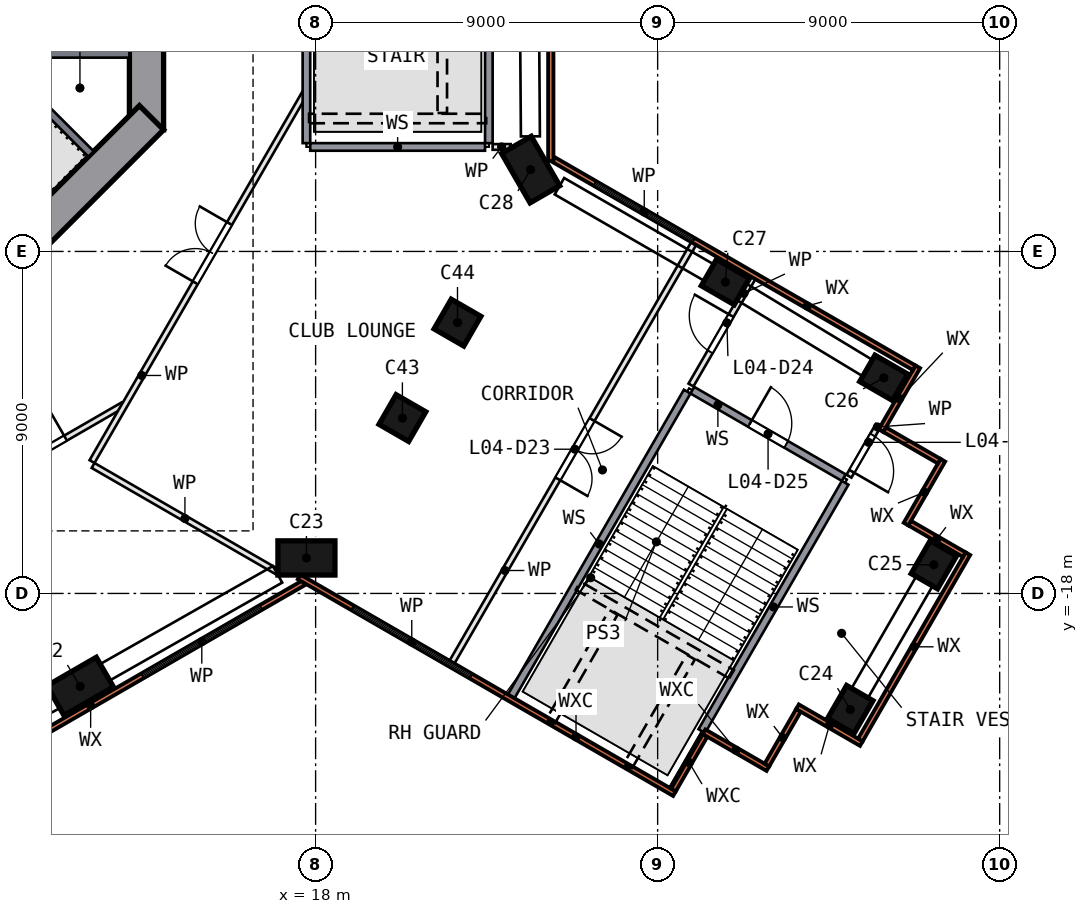
"""IFC4 building model, lengths in metres.
Left out: names, types, materials, properties, quantities, classifications, styles, units other than length and angle.
Written with IfcOpenShell. Run it as: python <this file> out.ifc"""

import sys

from ifc_helpers import new_model, si_unit, direction, frame, frame_2d, origin, origin_2d, place, context, subcontext, project, spatial, polyline, rectangle, outline, extrude, element, fill, save


model = new_model("IFC4")
c1 = context("Model", 3, precision=1e-05, world=origin(), true_north=direction((0.0, 1.0)))
c2 = subcontext(c1, "Body", "Model", "MODEL_VIEW")
j1 = project(units=[si_unit("LENGTHUNIT", "METRE"), si_unit("PLANEANGLEUNIT", "RADIAN")], contexts=[c1])
p1 = place(None, origin())
s1 = spatial("IfcSite", under=j1, at=p1, CompositionType="ELEMENT")
p2 = place(p1, origin())
s2 = spatial("IfcBuilding", under=s1, at=p2, CompositionType="ELEMENT")
p3 = place(p2, frame((0.0, 0.0, 23.5)))
s3 = spatial("IfcBuildingStorey", under=s2, at=p3, CompositionType="ELEMENT", Elevation=23.5)
for number, where, z_axis, x_axis in (
    (1, (11.804, -20.445, 0.0), (0.0, 0.0, 1.0), (0.866, 0.5, 0.0)),
    (2, (17.758, -17.065, 0.0), (0.0, 0.0, 1.0), (-1.0, 0.0, 0.0)),
):
    element("IfcColumn", number, at=place(p3, frame(where, z_axis=z_axis, x_axis=x_axis)), inside=s3, PredefinedType="COLUMN", context=c2, shape_type="SweptSolid", body=[
        extrude(rectangle(XDim=1.5, YDim=0.9, at=origin_2d()), origin(), (0.0, 0.0, 1.0), 4.0),
    ])
for number, where, z_axis, x_axis in (
    (3, (32.069, -21.055, 0.0), (0.0, 0.0, 1.0), (0.5, 0.866, 0.0)),
    (4, (34.269, -17.245, 0.0), (0.0, 0.0, 1.0), (0.5, 0.866, 0.0)),
    (5, (32.951, -12.327, 0.0), (0.0, 0.0, 1.0), (-0.866, 0.5, 0.0)),
    (6, (28.783, -9.805, 0.0), (0.0, 0.0, 1.0), (-0.866, 0.5, 0.0)),
):
    element("IfcColumn", number, at=place(p3, frame(where, z_axis=z_axis, x_axis=x_axis)), inside=s3, PredefinedType="COLUMN", context=c2, shape_type="SweptSolid", body=[
        extrude(rectangle(XDim=1.0, YDim=0.8, at=origin_2d()), origin(), (0.0, 0.0, 1.0), 4.0),
    ])
p4 = place(p3, frame((23.658, -6.846, 0.0), z_axis=(0.0, 0.0, 1.0), x_axis=(0.5, -0.866025404, 0.0)))
e7 = element("IfcColumn", 7, at=p4, inside=s3, PredefinedType="COLUMN", context=c2, shape_type="SweptSolid", body=[
    extrude(rectangle(XDim=1.5, YDim=0.9, at=origin_2d()), origin(), (0.0, 0.0, 1.0), 4.0),
])
for number, where, z_axis, x_axis in (
    (8, (20.283, -13.385, 0.0), (0.0, 0.0, 1.0), (0.866, -0.5, 0.0)),
    (9, (21.733, -10.873, 0.0), (0.0, 0.0, 1.0), (0.866, -0.5, 0.0)),
):
    element("IfcColumn", number, at=place(p3, frame(where, z_axis=z_axis, x_axis=x_axis)), inside=s3, PredefinedType="COLUMN", context=c2, shape_type="SweptSolid", body=[
        extrude(rectangle(XDim=0.9, YDim=0.9, at=origin_2d()), origin(), (0.0, 0.0, 1.0), 4.0),
    ])
p5 = place(p3, frame((13.55, -5.799, 0.0), z_axis=(0.0, 0.0, 1.0), x_axis=(0.0, 1.0, 0.0)))
e10 = element("IfcWall", 10, at=p5, inside=s3, PredefinedType="SHEAR", context=c2, shape_type="SweptSolid", body=[
    extrude(rectangle(XDim=11.598, YDim=0.9, at=frame_2d((5.799, 0.0))), origin(), (0.0, 0.0, 1.0), 4.5),
])
p6 = place(p5, frame((4.899, 0.0, 0.0)))
e11 = element("IfcOpeningElement", 11, at=p6, cuts=e10, PredefinedType="OPENING", context=c2, shape_type="SweptSolid", body=[
    extrude(rectangle(XDim=1.8, YDim=2.1, at=frame_2d((0.9, 1.05))), frame((0.0, 0.46, 0.0), z_axis=(0.0, -1.0, 0.0), x_axis=(1.0, 0.0, 0.0)), (0.0, 0.0, 1.0), 0.92),
])
p7 = place(p3, frame((5.481, -13.682, 0.0), z_axis=(0.0, 0.0, 1.0), x_axis=(0.707106781, 0.707106781, 0.0)))
e12 = element("IfcWall", 12, at=p7, inside=s3, PredefinedType="SHEAR", context=c2, shape_type="SweptSolid", body=[
    extrude(rectangle(XDim=11.598, YDim=0.9, at=frame_2d((5.799, 0.0))), origin(), (0.0, 0.0, 1.0), 4.5),
])
p8 = place(p7, frame((2.099, 0.0, 0.0)))
e13 = element("IfcOpeningElement", 13, at=p8, cuts=e12, PredefinedType="OPENING", context=c2, shape_type="SweptSolid", body=[
    extrude(rectangle(XDim=1.2, YDim=2.1, at=frame_2d((0.6, 1.05))), frame((0.0, 0.46, 0.0), z_axis=(0.0, -1.0, 0.0), x_axis=(1.0, 0.0, 0.0)), (0.0, 0.0, 1.0), 0.92),
])
p9 = place(p3, frame((6.603, -24.118, 0.0), z_axis=(0.0, 0.0, 1.0), x_axis=(0.866023287, 0.500003667, 0.0)))
e14 = element("IfcWall", 14, at=p9, inside=s3, PredefinedType="SOLIDWALL", context=c2, shape_type="SweptSolid", body=[
    extrude(rectangle(XDim=12.801, YDim=0.14, at=frame_2d((6.4, 0.0))), origin(), (0.0, 0.0, 1.0), 4.0),
])
p10 = place(p9, frame((1.748, 0.0, 0.9)))
e15 = element("IfcOpeningElement", 15, at=p10, cuts=e14, PredefinedType="OPENING", context=c2, shape_type="SweptSolid", body=[
    extrude(rectangle(XDim=3.0, YDim=2.4, at=frame_2d((1.5, 1.2))), frame((0.0, 0.08, 0.0), z_axis=(0.0, -1.0, 0.0), x_axis=(1.0, 0.0, 0.0)), (0.0, 0.0, 1.0), 0.16),
])
p11 = place(p9, frame((7.902, 0.0, 0.9)))
e16 = element("IfcOpeningElement", 16, at=p11, cuts=e14, PredefinedType="OPENING", context=c2, shape_type="SweptSolid", body=[
    extrude(rectangle(XDim=3.6, YDim=2.4, at=frame_2d((1.8, 1.2))), frame((0.0, 0.08, 0.0), z_axis=(0.0, -1.0, 0.0), x_axis=(1.0, 0.0, 0.0)), (0.0, 0.0, 1.0), 0.16),
])
p12 = place(p3, frame((17.565, -17.566, 0.0), z_axis=(0.0, 0.0, 1.0), x_axis=(0.866028022, -0.499995465, 0.0)))
e17 = element("IfcWall", 17, at=p12, inside=s3, PredefinedType="SOLIDWALL", context=c2, shape_type="SweptSolid", body=[
    extrude(rectangle(XDim=11.405, YDim=0.14, at=frame_2d((5.702, 0.0))), origin(), (0.0, 0.0, 1.0), 4.0),
])
p13 = place(p12, frame((1.623, 0.0, 0.9)))
e18 = element("IfcOpeningElement", 18, at=p13, cuts=e17, PredefinedType="OPENING", context=c2, shape_type="SweptSolid", body=[
    extrude(rectangle(XDim=3.6, YDim=2.4, at=frame_2d((1.8, 1.2))), frame((0.0, 0.08, 0.0), z_axis=(0.0, -1.0, 0.0), x_axis=(1.0, 0.0, 0.0)), (0.0, 0.0, 1.0), 0.16),
])
p14 = place(p3, frame((27.417, -23.173, 0.0), z_axis=(0.0, 0.0, 1.0), x_axis=(0.499951638, 0.866053324, 0.0)))
e19 = element("IfcWall", 19, at=p14, inside=s3, PredefinedType="SOLIDWALL", context=c2, shape_type="SweptSolid", body=[
    extrude(rectangle(XDim=1.66, YDim=0.14, at=frame_2d((0.83, 0.0))), origin(), (0.0, 0.0, 1.0), 4.0),
])
p15 = place(p3, frame((28.221, -21.64, 0.0), z_axis=(0.0, 0.0, 1.0), x_axis=(0.866011627, -0.500023862, 0.0)))
e20 = element("IfcWall", 20, at=p15, inside=s3, PredefinedType="SOLIDWALL", context=c2, shape_type="SweptSolid", body=[
    extrude(rectangle(XDim=1.94, YDim=0.14, at=frame_2d((0.97, 0.0))), origin(), (0.0, 0.0, 1.0), 4.0),
])
p16 = place(p3, frame((29.875, -22.514, 0.0), z_axis=(0.0, 0.0, 1.0), x_axis=(0.499998264, 0.866026406, 0.0)))
e21 = element("IfcWall", 21, at=p16, inside=s3, PredefinedType="SOLIDWALL", context=c2, shape_type="SweptSolid", body=[
    extrude(rectangle(XDim=1.66, YDim=0.14, at=frame_2d((0.83, 0.0))), origin(), (0.0, 0.0, 1.0), 4.0),
])
p17 = place(p3, frame((30.68, -20.981, 0.0), z_axis=(0.0, 0.0, 1.0), x_axis=(0.866043088, -0.499969368, 0.0)))
e22 = element("IfcWall", 22, at=p17, inside=s3, PredefinedType="SOLIDWALL", context=c2, shape_type="SweptSolid", body=[
    extrude(rectangle(XDim=1.94, YDim=0.14, at=frame_2d((0.97, 0.0))), origin(), (0.0, 0.0, 1.0), 4.0),
])
p18 = place(p3, frame((32.334, -21.855, 0.0), z_axis=(0.0, 0.0, 1.0), x_axis=(0.499985074, 0.866034021, 0.0)))
e23 = element("IfcWall", 23, at=p18, inside=s3, PredefinedType="SOLIDWALL", context=c2, shape_type="SweptSolid", body=[
    extrude(rectangle(XDim=5.66, YDim=0.14, at=frame_2d((2.83, 0.0))), origin(), (0.0, 0.0, 1.0), 4.0),
])
p19 = place(p3, frame((35.069, -16.979, 0.0), z_axis=(0.0, 0.0, 1.0), x_axis=(-0.866053324, 0.499951638, 0.0)))
e24 = element("IfcWall", 24, at=p19, inside=s3, PredefinedType="SOLIDWALL", context=c2, shape_type="SweptSolid", body=[
    extrude(rectangle(XDim=1.66, YDim=0.14, at=frame_2d((0.83, 0.0))), origin(), (0.0, 0.0, 1.0), 4.0),
])
p20 = place(p3, frame((33.535, -16.175, 0.0), z_axis=(0.0, 0.0, 1.0), x_axis=(0.500063744, 0.865988598, 0.0)))
e25 = element("IfcWall", 25, at=p20, inside=s3, PredefinedType="SOLIDWALL", context=c2, shape_type="SweptSolid", body=[
    extrude(rectangle(XDim=1.94, YDim=0.14, at=frame_2d((0.97, 0.0))), origin(), (0.0, 0.0, 1.0), 4.0),
])
p21 = place(p3, frame((34.41, -14.52, 0.0), z_axis=(0.0, 0.0, 1.0), x_axis=(-0.865989634, 0.500061949, 0.0)))
e26 = element("IfcWall", 26, at=p21, inside=s3, PredefinedType="SOLIDWALL", context=c2, shape_type="SweptSolid", body=[
    extrude(rectangle(XDim=1.66, YDim=0.14, at=frame_2d((0.83, 0.0))), origin(), (0.0, 0.0, 1.0), 4.0),
])
p22 = place(p3, frame((32.877, -13.716, 0.0), z_axis=(0.0, 0.0, 1.0), x_axis=(0.500023862, 0.866011627, 0.0)))
e27 = element("IfcWall", 27, at=p22, inside=s3, PredefinedType="SOLIDWALL", context=c2, shape_type="SweptSolid", body=[
    extrude(rectangle(XDim=1.94, YDim=0.14, at=frame_2d((0.97, 0.0))), origin(), (0.0, 0.0, 1.0), 4.0),
])
p23 = place(p3, frame((33.751, -12.062, 0.0), z_axis=(0.0, 0.0, 1.0), x_axis=(-0.86602647, 0.499998154, 0.0)))
e28 = element("IfcWall", 28, at=p23, inside=s3, PredefinedType="SOLIDWALL", context=c2, shape_type="SweptSolid", body=[
    extrude(rectangle(XDim=10.961, YDim=0.14, at=frame_2d((5.481, 0.0))), origin(), (0.0, 0.0, 1.0), 4.0),
])
p24 = place(p23, frame((6.702, 0.0, 0.9)))
e29 = element("IfcOpeningElement", 29, at=p24, cuts=e28, PredefinedType="OPENING", context=c2, shape_type="SweptSolid", body=[
    extrude(rectangle(XDim=3.0, YDim=2.4, at=frame_2d((1.5, 1.2))), frame((0.0, 0.08, 0.0), z_axis=(0.0, -1.0, 0.0), x_axis=(1.0, 0.0, 0.0)), (0.0, 0.0, 1.0), 0.16),
])
p25 = place(p3, frame((24.188, -6.621, 0.0), z_axis=(0.0, 0.0, 1.0), x_axis=(0.0, 1.0, 0.0)))
e30 = element("IfcWall", 30, at=p25, inside=s3, PredefinedType="SOLIDWALL", context=c2, shape_type="SweptSolid", body=[
    extrude(rectangle(XDim=13.242, YDim=0.14, at=frame_2d((6.621, 0.0))), origin(), (0.0, 0.0, 1.0), 4.0),
])
p26 = place(p3, origin())
e31 = element("IfcWall", 31, at=p26, inside=s3, PredefinedType="SOLIDWALL", context=c2, shape_type="SweptSolid", body=[
    extrude(outline(polyline([(13.1, -3.9), (10.9, -3.9), (10.9, -3.7), (12.9, -3.7), (12.9, -1.4), (10.9, -1.4), (10.9, -1.2), (13.1, -1.2), (13.1, -3.9)])), origin(), (0.0, 0.0, 1.0), 4.0),
])
p27 = place(p3, frame((9.334, -3.677, 0.0), z_axis=(0.0, 0.0, 1.0), x_axis=(0.707106781, -0.707106781, 0.0)))
e32 = element("IfcWall", 32, at=p27, inside=s3, PredefinedType="SOLIDWALL", context=c2, shape_type="SweptSolid", body=[
    extrude(rectangle(XDim=3.9, YDim=0.2, at=frame_2d((1.95, 0.0))), origin(), (0.0, 0.0, 1.0), 4.0),
])
p28 = place(p3, frame((12.144, -14.633, 0.0), z_axis=(0.0, 0.0, 1.0), x_axis=(0.866016603, -0.500015243, 0.0)))
e33 = element("IfcWall", 33, at=p28, inside=s3, PredefinedType="PARTITIONING", context=c2, shape_type="SweptSolid", body=[
    extrude(rectangle(XDim=5.582, YDim=0.15, at=frame_2d((2.791, 0.0))), origin(), (0.0, 0.0, 1.0), 4.0),
])
p29 = place(p3, frame((4.823, -17.721, 0.0), z_axis=(0.0, 0.0, 1.0), x_axis=(0.866037142, 0.499979668, 0.0)))
e34 = element("IfcWall", 34, at=p29, inside=s3, PredefinedType="PARTITIONING", context=c2, shape_type="SweptSolid", body=[
    extrude(rectangle(XDim=9.367, YDim=0.15, at=frame_2d((4.683, 0.0))), origin(), (0.0, 0.0, 1.0), 4.0),
])
p30 = place(p29, frame((5.817, 0.0, 0.0)))
e35 = element("IfcOpeningElement", 35, at=p30, cuts=e34, PredefinedType="OPENING", context=c2, shape_type="SweptSolid", body=[
    extrude(rectangle(XDim=1.8, YDim=2.1, at=frame_2d((0.9, 1.05))), frame((0.0, 0.085, 0.0), z_axis=(0.0, -1.0, 0.0), x_axis=(1.0, 0.0, 0.0)), (0.0, 0.0, 1.0), 0.17),
])
p31 = place(p3, frame((17.858, -6.25, 0.0), z_axis=(0.0, 0.0, 1.0), x_axis=(1.0, 0.0, 0.0)))
e36 = element("IfcWall", 36, at=p31, inside=s3, PredefinedType="SOLIDWALL", context=c2, shape_type="SweptSolid", body=[
    extrude(rectangle(XDim=4.6, YDim=0.2, at=frame_2d((2.3, 0.0))), origin(), (0.0, 0.0, 1.0), 4.0),
])
p32 = place(p3, frame((12.117, -14.53, 0.0), z_axis=(0.0, 0.0, 1.0), x_axis=(0.500001509, 0.866024532, 0.0)))
e37 = element("IfcWall", 37, at=p32, inside=s3, PredefinedType="PARTITIONING", context=c2, shape_type="SweptSolid", body=[
    extrude(rectangle(XDim=11.183, YDim=0.15, at=frame_2d((5.592, 0.0))), origin(), (0.0, 0.0, 1.0), 4.0),
])
p33 = place(p32, frame((5.433, 0.0, 0.0)))
e38 = element("IfcOpeningElement", 38, at=p33, cuts=e37, PredefinedType="OPENING", context=c2, shape_type="SweptSolid", body=[
    extrude(rectangle(XDim=1.8, YDim=2.1, at=frame_2d((0.9, 1.05))), frame((0.0, 0.085, 0.0), z_axis=(0.0, -1.0, 0.0), x_axis=(1.0, 0.0, 0.0)), (0.0, 0.0, 1.0), 0.17),
])
p34 = place(p3, frame((17.758, 3.15, 0.0), z_axis=(0.0, 0.0, 1.0), x_axis=(0.0, -1.0, 0.0)))
e39 = element("IfcWall", 39, at=p34, inside=s3, PredefinedType="SOLIDWALL", context=c2, shape_type="SweptSolid", body=[
    extrude(rectangle(XDim=9.3, YDim=0.2, at=frame_2d((4.65, 0.0))), origin(), (0.0, 0.0, 1.0), 4.0),
])
p35 = place(p3, frame((22.558, -6.15, 0.0), z_axis=(0.0, 0.0, 1.0), x_axis=(0.0, 1.0, 0.0)))
e40 = element("IfcWall", 40, at=p35, inside=s3, PredefinedType="SOLIDWALL", context=c2, shape_type="SweptSolid", body=[
    extrude(rectangle(XDim=9.5, YDim=0.2, at=frame_2d((4.75, 0.0))), origin(), (0.0, 0.0, 1.0), 4.0),
])
p36 = place(p3, frame((22.658, -6.25, 0.0), z_axis=(0.0, 0.0, 1.0), x_axis=(1.0, 0.0, 0.0)))
e41 = element("IfcWall", 41, at=p36, inside=s3, PredefinedType="PARTITIONING", context=c2, shape_type="SweptSolid", body=[
    extrude(rectangle(XDim=0.473, YDim=0.15, at=frame_2d((0.237, 0.0))), origin(), (0.0, 0.0, 1.0), 4.0),
])
p37 = place(p3, frame((28.162, -21.623, 0.0), z_axis=(0.0, 0.0, 1.0), x_axis=(0.499981072, 0.866036332, 0.0)))
e42 = element("IfcWall", 42, at=p37, inside=s3, PredefinedType="SOLIDWALL", context=c2, shape_type="SweptSolid", body=[
    extrude(rectangle(XDim=7.545, YDim=0.2, at=frame_2d((3.772, 0.0))), origin(), (0.0, 0.0, 1.0), 4.0),
])
p38 = place(p3, frame((27.777, -12.688, 0.0), z_axis=(0.0, 0.0, 1.0), x_axis=(-0.500003922, -0.866023139, 0.0)))
e43 = element("IfcWall", 43, at=p38, inside=s3, PredefinedType="SOLIDWALL", context=c2, shape_type="SweptSolid", body=[
    extrude(rectangle(XDim=9.26, YDim=0.2, at=frame_2d((4.63, 0.0))), origin(), (0.0, 0.0, 1.0), 4.0),
])
p39 = place(p3, frame((27.948, -8.792, 0.0), z_axis=(0.0, 0.0, 1.0), x_axis=(-0.499991053, -0.866030569, 0.0)))
e44 = element("IfcWall", 44, at=p39, inside=s3, PredefinedType="PARTITIONING", context=c2, shape_type="SweptSolid", body=[
    extrude(rectangle(XDim=12.72, YDim=0.15, at=frame_2d((6.36, 0.0))), origin(), (0.0, 0.0, 1.0), 4.0),
])
p40 = place(p39, frame((5.35, 0.0, 0.0)))
e45 = element("IfcOpeningElement", 45, at=p40, cuts=e44, PredefinedType="OPENING", context=c2, shape_type="SweptSolid", body=[
    extrude(rectangle(XDim=1.8, YDim=2.1, at=frame_2d((0.9, 1.05))), frame((0.0, 0.085, 0.0), z_axis=(0.0, -1.0, 0.0), x_axis=(1.0, 0.0, 0.0)), (0.0, 0.0, 1.0), 0.17),
])
p41 = place(p3, frame((27.877, -12.515, 0.0), z_axis=(0.0, 0.0, 1.0), x_axis=(0.499973122, 0.866040921, 0.0)))
e46 = element("IfcWall", 46, at=p41, inside=s3, PredefinedType="PARTITIONING", context=c2, shape_type="SweptSolid", body=[
    extrude(rectangle(XDim=3.26, YDim=0.15, at=frame_2d((1.63, 0.0))), origin(), (0.0, 0.0, 1.0), 4.0),
])
p42 = place(p41, frame((1.01, 0.0, 0.0)))
e47 = element("IfcOpeningElement", 47, at=p42, cuts=e46, PredefinedType="OPENING", context=c2, shape_type="SweptSolid", body=[
    extrude(rectangle(XDim=1.1, YDim=2.1, at=frame_2d((0.55, 1.05))), frame((0.0, 0.085, 0.0), z_axis=(0.0, -1.0, 0.0), x_axis=(1.0, 0.0, 0.0)), (0.0, 0.0, 1.0), 0.17),
])
p43 = place(p3, frame((27.914, -12.652, 0.0), z_axis=(0.0, 0.0, 1.0), x_axis=(0.86601677, -0.500014953, 0.0)))
e48 = element("IfcWall", 48, at=p43, inside=s3, PredefinedType="SOLIDWALL", context=c2, shape_type="SweptSolid", body=[
    extrude(rectangle(XDim=4.6, YDim=0.2, at=frame_2d((2.3, 0.0))), origin(), (0.0, 0.0, 1.0), 4.0),
])
p44 = place(p43, frame((1.75, 0.0, 0.0)))
e49 = element("IfcOpeningElement", 49, at=p44, cuts=e48, PredefinedType="OPENING", context=c2, shape_type="SweptSolid", body=[
    extrude(rectangle(XDim=1.1, YDim=2.1, at=frame_2d((0.55, 1.05))), frame((0.0, 0.11, 0.0), z_axis=(0.0, -1.0, 0.0), x_axis=(1.0, 0.0, 0.0)), (0.0, 0.0, 1.0), 0.22),
])
p45 = place(p3, frame((32.807, -13.577, 0.0), z_axis=(0.0, 0.0, 1.0), x_axis=(-0.499995951, -0.866027742, 0.0)))
e50 = element("IfcWall", 50, at=p45, inside=s3, PredefinedType="PARTITIONING", context=c2, shape_type="SweptSolid", body=[
    extrude(rectangle(XDim=1.545, YDim=0.15, at=frame_2d((0.773, 0.0))), origin(), (0.0, 0.0, 1.0), 4.0),
])
p46 = place(p45, frame((0.295, 0.0, 0.0)))
e51 = element("IfcOpeningElement", 51, at=p46, cuts=e50, PredefinedType="OPENING", context=c2, shape_type="SweptSolid", body=[
    extrude(rectangle(XDim=1.1, YDim=2.1, at=frame_2d((0.55, 1.05))), frame((0.0, 0.085, 0.0), z_axis=(0.0, -1.0, 0.0), x_axis=(1.0, 0.0, 0.0)), (0.0, 0.0, 1.0), 0.17),
])
p47 = place(p11, origin())
e52 = element("IfcWindow", 52, at=p47, inside=s3, PartitioningType="SINGLE_PANEL", PredefinedType="WINDOW", context=c2, shape_type="SweptSolid", body=[
    extrude(rectangle(XDim=3.6, YDim=2.4, at=frame_2d((1.8, 1.2))), frame((0.0, 0.03, 0.0), z_axis=(0.0, -1.0, 0.0), x_axis=(1.0, 0.0, 0.0)), (0.0, 0.0, 1.0), 0.06),
])
fill(e16, e52)
p48 = place(p13, origin())
e53 = element("IfcWindow", 53, at=p48, inside=s3, PartitioningType="SINGLE_PANEL", PredefinedType="WINDOW", context=c2, shape_type="SweptSolid", body=[
    extrude(rectangle(XDim=3.6, YDim=2.4, at=frame_2d((1.8, 1.2))), frame((0.0, 0.03, 0.0), z_axis=(0.0, -1.0, 0.0), x_axis=(1.0, 0.0, 0.0)), (0.0, 0.0, 1.0), 0.06),
])
fill(e18, e53)
p49 = place(p24, origin())
e54 = element("IfcWindow", 54, at=p49, inside=s3, PartitioningType="SINGLE_PANEL", PredefinedType="WINDOW", context=c2, shape_type="SweptSolid", body=[
    extrude(rectangle(XDim=3.0, YDim=2.4, at=frame_2d((1.5, 1.2))), frame((0.0, 0.03, 0.0), z_axis=(0.0, -1.0, 0.0), x_axis=(1.0, 0.0, 0.0)), (0.0, 0.0, 1.0), 0.06),
])
fill(e29, e54)
p50 = place(p30, origin())
e55 = element("IfcDoor", 55, at=p50, inside=s3, OperationType="DOUBLE_DOOR_SINGLE_SWING", PredefinedType="DOOR", context=c2, shape_type="SweptSolid", body=[
    extrude(rectangle(XDim=1.8, YDim=2.1, at=frame_2d((0.9, 1.05))), frame((0.0, 0.025, 0.0), z_axis=(0.0, -1.0, 0.0), x_axis=(1.0, 0.0, 0.0)), (0.0, 0.0, 1.0), 0.05),
])
fill(e35, e55)
p51 = place(p33, origin())
e56 = element("IfcDoor", 56, at=p51, inside=s3, OperationType="DOUBLE_DOOR_SINGLE_SWING", PredefinedType="DOOR", context=c2, shape_type="SweptSolid", body=[
    extrude(rectangle(XDim=1.8, YDim=2.1, at=frame_2d((0.9, 1.05))), frame((0.0, 0.025, 0.0), z_axis=(0.0, -1.0, 0.0), x_axis=(1.0, 0.0, 0.0)), (0.0, 0.0, 1.0), 0.05),
])
fill(e38, e56)
p52 = place(p40, origin())
e57 = element("IfcDoor", 57, at=p52, inside=s3, OperationType="DOUBLE_DOOR_SINGLE_SWING", PredefinedType="DOOR", context=c2, shape_type="SweptSolid", body=[
    extrude(rectangle(XDim=1.8, YDim=2.1, at=frame_2d((0.9, 1.05))), frame((0.0, 0.025, 0.0), z_axis=(0.0, -1.0, 0.0), x_axis=(1.0, 0.0, 0.0)), (0.0, 0.0, 1.0), 0.05),
])
fill(e45, e57)
p53 = place(p42, origin())
e58 = element("IfcDoor", 58, at=p53, inside=s3, OperationType="SINGLE_SWING_RIGHT", PredefinedType="DOOR", context=c2, shape_type="SweptSolid", body=[
    extrude(rectangle(XDim=1.1, YDim=2.1, at=frame_2d((0.55, 1.05))), frame((0.0, 0.025, 0.0), z_axis=(0.0, -1.0, 0.0), x_axis=(1.0, 0.0, 0.0)), (0.0, 0.0, 1.0), 0.05),
])
fill(e47, e58)
p54 = place(p44, origin())
e59 = element("IfcDoor", 59, at=p54, inside=s3, OperationType="SINGLE_SWING_LEFT", PredefinedType="DOOR", context=c2, shape_type="SweptSolid", body=[
    extrude(rectangle(XDim=1.1, YDim=2.1, at=frame_2d((0.55, 1.05))), frame((0.0, 0.025, 0.0), z_axis=(0.0, -1.0, 0.0), x_axis=(1.0, 0.0, 0.0)), (0.0, 0.0, 1.0), 0.05),
])
fill(e49, e59)
p55 = place(p46, origin())
e60 = element("IfcDoor", 60, at=p55, inside=s3, OperationType="SINGLE_SWING_RIGHT", PredefinedType="DOOR", context=c2, shape_type="SweptSolid", body=[
    extrude(rectangle(XDim=1.1, YDim=2.1, at=frame_2d((0.55, 1.05))), frame((0.0, 0.025, 0.0), z_axis=(0.0, -1.0, 0.0), x_axis=(1.0, 0.0, 0.0)), (0.0, 0.0, 1.0), 0.05),
])
fill(e51, e60)
save(model, sys.argv[1])
